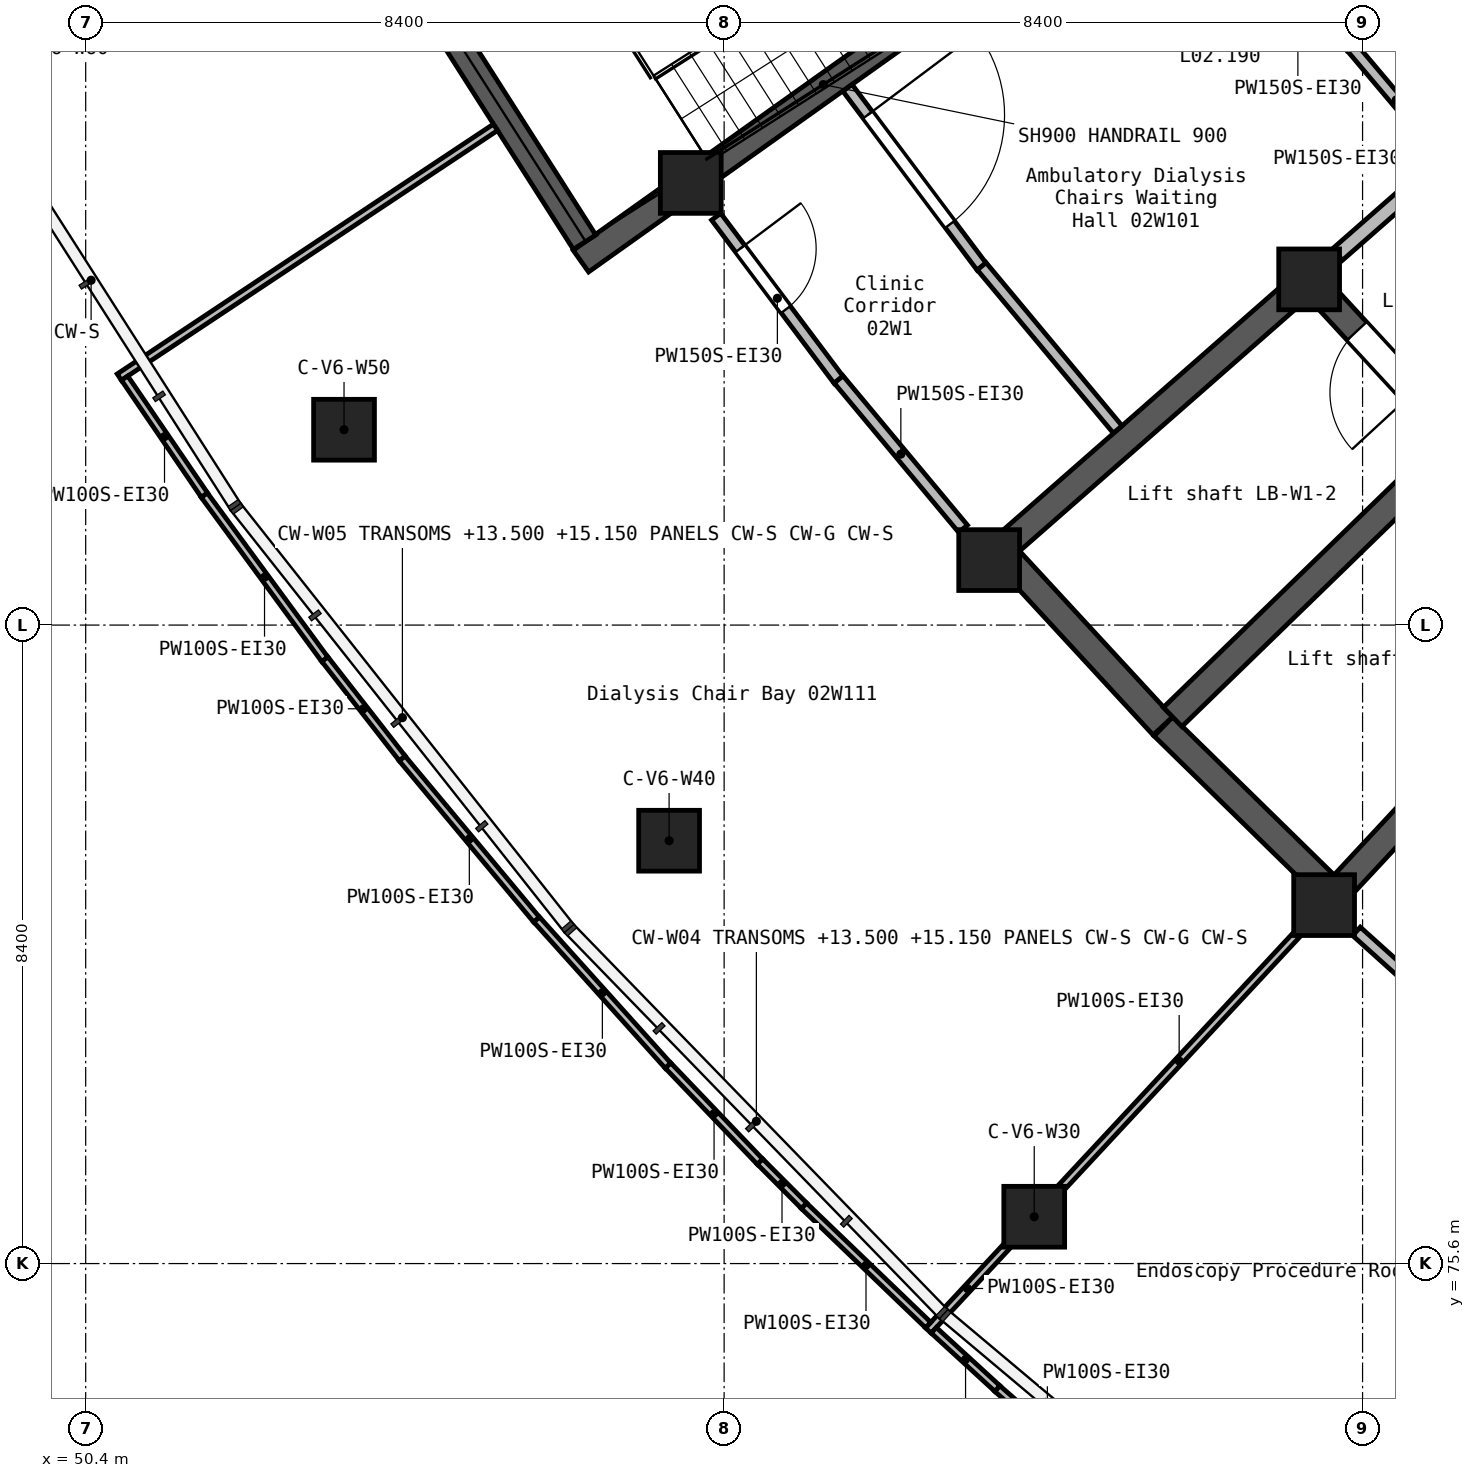
"""IFC4 building model, lengths in metres.
Left out: names, types, materials, properties, quantities, classifications, styles, units other than length and angle.
Written with IfcOpenShell. Run it as: python <this file> out.ifc"""

import sys

from ifc_helpers import new_model, si_unit, direction, frame, frame_2d, origin, origin_2d, place, context, subcontext, project, spatial, rectangle, extrude, element, fill, save


model = new_model("IFC4")
c1 = context("Model", 3, precision=1e-05, world=origin(), true_north=direction((0.0, 1.0)))
c2 = subcontext(c1, "Body", "Model", "MODEL_VIEW")
j1 = project(units=[si_unit("LENGTHUNIT", "METRE"), si_unit("PLANEANGLEUNIT", "RADIAN")], contexts=[c1])
p1 = place(None, origin())
s1 = spatial("IfcSite", under=j1, at=p1, CompositionType="ELEMENT")
p2 = place(p1, origin())
s2 = spatial("IfcBuilding", under=s1, at=p2, CompositionType="ELEMENT")
p3 = place(p2, frame((0.0, 0.0, 12.6)))
s3 = spatial("IfcBuildingStorey", under=s2, at=p3, CompositionType="ELEMENT", Elevation=12.6)
for number, where, z_axis, x_axis in (
    (1, (53.799, 86.57, 0.0), (0.0, 0.0, 1.0), (1.0, 0.0, 0.0)),
    (2, (58.076, 81.163, 0.0), (0.0, 0.0, 1.0), (1.0, 0.0, 0.0)),
    (3, (58.361, 89.817, 0.0), (0.0, 0.0, 1.0), (1.0, 0.0, 0.0)),
    (4, (62.287, 84.855, 0.0), (0.0, 0.0, 1.0), (1.0, 0.0, 0.0)),
    (5, (62.88, 76.216, 0.0), (0.0, 0.0, 1.0), (1.0, 0.0, 0.0)),
    (6, (66.497, 88.548, 0.0), (0.0, 0.0, 1.0), (1.0, 0.0, 0.0)),
    (7, (66.694, 80.316, 0.0), (0.0, 0.0, 1.0), (1.0, 0.0, 0.0)),
):
    element("IfcColumn", number, at=place(p3, frame(where, z_axis=z_axis, x_axis=x_axis)), inside=s3, PredefinedType="COLUMN", context=c2, shape_type="SweptSolid", body=[
        extrude(rectangle(XDim=0.8, YDim=0.8, at=origin_2d()), origin(), (0.0, 0.0, 1.0), 4.2),
    ])
p4 = place(p3, frame((56.916, 88.789, 0.0), z_axis=(0.0, 0.0, 1.0), x_axis=(0.814717690591, 0.579857814157, 0.0)))
e8 = element("IfcWall", 8, at=p4, inside=s3, PredefinedType="SHEAR", context=c2, shape_type="SweptSolid", body=[
    extrude(rectangle(XDim=7.55, YDim=0.35, at=frame_2d((3.775, 0.0))), origin(), (0.0, 0.0, 1.0), 4.2),
])
p5 = place(p3, frame((56.964, 89.038, 0.0), z_axis=(0.0, 0.0, 1.0), x_axis=(-0.537811796172, 0.843064927451, 0.0)))
e9 = element("IfcWall", 9, at=p5, inside=s3, PredefinedType="SHEAR", context=c2, shape_type="SweptSolid", body=[
    extrude(rectangle(XDim=6.139, YDim=0.35, at=frame_2d((3.07, 0.0))), origin(), (0.0, 0.0, 1.0), 4.2),
])
p6 = place(p3, frame((62.305, 84.872, 0.0), z_axis=(0.0, 0.0, 1.0), x_axis=(0.751808220443, 0.659381831471, 0.0)))
e10 = element("IfcWall", 10, at=p6, inside=s3, PredefinedType="SHEAR", context=c2, shape_type="SweptSolid", body=[
    extrude(rectangle(XDim=5.75, YDim=0.35, at=frame_2d((2.875, 0.0))), origin(), (0.0, 0.0, 1.0), 4.2),
])
p7 = place(p3, frame((62.556, 84.858, 0.0), z_axis=(0.0, 0.0, 1.0), x_axis=(0.67818124014, -0.73489469009, 0.0)))
e11 = element("IfcWall", 11, at=p7, inside=s3, PredefinedType="SHEAR", context=c2, shape_type="SweptSolid", body=[
    extrude(rectangle(XDim=2.975, YDim=0.35, at=frame_2d((1.487, 0.0))), origin(), (0.0, 0.0, 1.0), 4.2),
])
p8 = place(p3, frame((64.579, 82.666, 0.0), z_axis=(0.0, 0.0, 1.0), x_axis=(0.714695816666, -0.699435407769, 0.0)))
e12 = element("IfcWall", 12, at=p8, inside=s3, PredefinedType="SHEAR", context=c2, shape_type="SweptSolid", body=[
    extrude(rectangle(XDim=2.976, YDim=0.35, at=frame_2d((1.488, 0.0))), origin(), (0.0, 0.0, 1.0), 4.2),
])
p9 = place(p3, frame((64.702, 82.791, 0.0), z_axis=(0.0, 0.0, 1.0), x_axis=(0.717400873641, 0.696660596345, 0.0)))
e13 = element("IfcWall", 13, at=p9, inside=s3, PredefinedType="SHEAR", context=c2, shape_type="SweptSolid", body=[
    extrude(rectangle(XDim=5.05, YDim=0.35, at=frame_2d((2.525, 0.0))), origin(), (0.0, 0.0, 1.0), 4.2),
])
p10 = place(p3, frame((66.712, 80.334, 0.0), z_axis=(0.0, 0.0, 1.0), x_axis=(0.681084356202, 0.732204957465, 0.0)))
e14 = element("IfcWall", 14, at=p10, inside=s3, PredefinedType="SHEAR", context=c2, shape_type="SweptSolid", body=[
    extrude(rectangle(XDim=5.75, YDim=0.35, at=frame_2d((2.875, 0.0))), origin(), (0.0, 0.0, 1.0), 4.2),
])
p11 = place(p3, frame((68.447, 86.434, 0.0), z_axis=(0.0, 0.0, 1.0), x_axis=(-0.678058558992, 0.735007884704, 0.0)))
e15 = element("IfcWall", 15, at=p11, inside=s3, PredefinedType="SHEAR", context=c2, shape_type="SweptSolid", body=[
    extrude(rectangle(XDim=2.701, YDim=0.35, at=frame_2d((1.35, 0.0))), origin(), (0.0, 0.0, 1.0), 4.2),
])
p12 = place(p11, frame((0.85, 0.0, 0.0)))
e16 = element("IfcOpeningElement", 16, at=p12, cuts=e15, PredefinedType="OPENING", context=c2, shape_type="SweptSolid", body=[
    extrude(rectangle(XDim=1.1, YDim=2.1, at=frame_2d((0.55, 1.05))), frame((0.0, 0.185, 0.0), z_axis=(0.0, -1.0, 0.0), x_axis=(1.0, 0.0, 0.0)), (0.0, 0.0, 1.0), 0.37),
])
p13 = place(p3, frame((66.869, 88.874, 0.0), z_axis=(0.0, 0.0, 1.0), x_axis=(0.751874567132, 0.659306177205, 0.0)))
e17 = element("IfcWall", 17, at=p13, inside=s3, PredefinedType="SOLIDWALL", context=c2, shape_type="SweptSolid", body=[
    extrude(rectangle(XDim=2.004, YDim=0.2, at=frame_2d((1.002, 0.0))), origin(), (0.0, 0.0, 1.0), 3.85),
])
p14 = place(p3, frame((58.695, 89.373, 0.0), z_axis=(0.0, 0.0, 1.0), x_axis=(0.600189191088, -0.799858071724, 0.0)))
e18 = element("IfcWall", 18, at=p14, inside=s3, PredefinedType="PARTITIONING", context=c2, shape_type="SweptSolid", body=[
    extrude(rectangle(XDim=2.684, YDim=0.15, at=frame_2d((1.342, 0.0))), origin(), (0.0, 0.0, 1.0), 3.85),
])
p15 = place(p14, frame((0.526, 0.0, 0.0)))
e19 = element("IfcOpeningElement", 19, at=p15, cuts=e18, PredefinedType="OPENING", context=c2, shape_type="SweptSolid", body=[
    extrude(rectangle(XDim=1.0, YDim=2.1, at=frame_2d((0.5, 1.05))), frame((0.0, 0.085, 0.0), z_axis=(0.0, -1.0, 0.0), x_axis=(1.0, 0.0, 0.0)), (0.0, 0.0, 1.0), 0.17),
])
p16 = place(p3, frame((60.307, 87.231, 0.0), z_axis=(0.0, 0.0, 1.0), x_axis=(0.64023135863, -0.768182144694, 0.0)))
e20 = element("IfcWall", 20, at=p16, inside=s3, PredefinedType="PARTITIONING", context=c2, shape_type="SweptSolid", body=[
    extrude(rectangle(XDim=2.557, YDim=0.15, at=frame_2d((1.278, 0.0))), origin(), (0.0, 0.0, 1.0), 3.85),
])
p17 = place(p3, frame((67.12, 79.971, 0.0), z_axis=(0.0, 0.0, 1.0), x_axis=(0.743284610851, -0.668975326355, 0.0)))
e21 = element("IfcWall", 21, at=p17, inside=s3, PredefinedType="PARTITIONING", context=c2, shape_type="SweptSolid", body=[
    extrude(rectangle(XDim=2.546, YDim=0.15, at=frame_2d((1.273, 0.0))), origin(), (0.0, 0.0, 1.0), 3.85),
])
p18 = place(p3, frame((60.423, 91.068, 0.0), z_axis=(0.0, 0.0, 1.0), x_axis=(0.600119519183, -0.799910346661, 0.0)))
e22 = element("IfcWall", 22, at=p18, inside=s3, PredefinedType="PARTITIONING", context=c2, shape_type="SweptSolid", body=[
    extrude(rectangle(XDim=2.941, YDim=0.15, at=frame_2d((1.471, 0.0))), origin(), (0.0, 0.0, 1.0), 3.85),
])
p19 = place(p18, frame((0.445, 0.0, 0.0)))
e23 = element("IfcOpeningElement", 23, at=p19, cuts=e22, PredefinedType="OPENING", context=c2, shape_type="SweptSolid", body=[
    extrude(rectangle(XDim=1.8, YDim=2.1, at=frame_2d((0.9, 1.05))), frame((0.0, 0.085, 0.0), z_axis=(0.0, -1.0, 0.0), x_axis=(1.0, 0.0, 0.0)), (0.0, 0.0, 1.0), 0.17),
])
p20 = place(p3, frame((62.189, 88.72, 0.0), z_axis=(0.0, 0.0, 1.0), x_axis=(0.640253147886, -0.7681639842, 0.0)))
e24 = element("IfcWall", 24, at=p20, inside=s3, PredefinedType="PARTITIONING", context=c2, shape_type="SweptSolid", body=[
    extrude(rectangle(XDim=2.794, YDim=0.15, at=frame_2d((1.397, 0.0))), origin(), (0.0, 0.0, 1.0), 3.85),
])
p21 = place(p3, frame((67.052, 91.609, 0.0), z_axis=(0.0, 0.0, 1.0), x_axis=(0.645369063346, -0.763870913228, 0.0)))
e25 = element("IfcWall", 25, at=p21, inside=s3, PredefinedType="PARTITIONING", context=c2, shape_type="SweptSolid", body=[
    extrude(rectangle(XDim=1.833, YDim=0.15, at=frame_2d((0.917, 0.0))), origin(), (0.0, 0.0, 1.0), 3.85),
])
p22 = place(p3, frame((61.487, 74.719, 0.0), z_axis=(0.0, 0.0, 1.0), x_axis=(0.681355821593, 0.731952351168, 0.0)))
e26 = element("IfcWall", 26, at=p22, inside=s3, PredefinedType="PARTITIONING", context=c2, shape_type="SweptSolid", body=[
    extrude(rectangle(XDim=1.51, YDim=0.1, at=frame_2d((0.755, 0.0))), origin(), (0.0, 0.0, 1.0), 3.85),
])
p23 = place(p3, frame((63.244, 76.607, 0.0), z_axis=(0.0, 0.0, 1.0), x_axis=(0.681263193371, 0.732038565485, 0.0)))
e27 = element("IfcWall", 27, at=p23, inside=s3, PredefinedType="PARTITIONING", context=c2, shape_type="SweptSolid", body=[
    extrude(rectangle(XDim=4.529, YDim=0.1, at=frame_2d((2.265, 0.0))), origin(), (0.0, 0.0, 1.0), 3.85),
])
p24 = place(p3, frame((50.842, 87.262, 0.0), z_axis=(0.0, 0.0, 1.0), x_axis=(0.833066771492, 0.553172445297, 0.0)))
e28 = element("IfcWall", 28, at=p24, inside=s3, PredefinedType="PARTITIONING", context=c2, shape_type="SweptSolid", body=[
    extrude(rectangle(XDim=5.941, YDim=0.1, at=frame_2d((2.97, 0.0))), origin(), (0.0, 0.0, 1.0), 3.85),
])
p25 = place(p3, frame((54.562, 82.247, 0.0), z_axis=(0.0, 0.0, 1.0), x_axis=(0.640436201221, -0.768011375024, 0.0)))
e29 = element("IfcWall", 29, at=p25, inside=s3, PredefinedType="PARTITIONING", context=c2, shape_type="SweptSolid", body=[
    extrude(rectangle(XDim=2.765, YDim=0.1, at=frame_2d((1.383, 0.0))), origin(), (0.0, 0.0, 1.0), 3.85),
])
p26 = place(p3, frame((56.333, 80.126, 0.0), z_axis=(0.0, 0.0, 1.0), x_axis=(0.66858915831, -0.743631990564, 0.0)))
e30 = element("IfcWall", 30, at=p26, inside=s3, PredefinedType="PARTITIONING", context=c2, shape_type="SweptSolid", body=[
    extrude(rectangle(XDim=2.586, YDim=0.1, at=frame_2d((1.293, 0.0))), origin(), (0.0, 0.0, 1.0), 3.85),
])
p27 = place(p3, frame((51.959, 85.711, 0.0), z_axis=(0.0, 0.0, 1.0), x_axis=(0.591667432582, -0.806182143949, 0.0)))
e31 = element("IfcWall", 31, at=p27, inside=s3, PredefinedType="PARTITIONING", context=c2, shape_type="SweptSolid", body=[
    extrude(rectangle(XDim=2.683, YDim=0.1, at=frame_2d((1.341, 0.0))), origin(), (0.0, 0.0, 1.0), 3.85),
])
p28 = place(p3, frame((59.849, 76.362, 0.0), z_axis=(0.0, 0.0, 1.0), x_axis=(0.721335676567, -0.692585620492, 0.0)))
e32 = element("IfcWall", 32, at=p28, inside=s3, PredefinedType="PARTITIONING", context=c2, shape_type="SweptSolid", body=[
    extrude(rectangle(XDim=2.267, YDim=0.1, at=frame_2d((1.134, 0.0))), origin(), (0.0, 0.0, 1.0), 3.85),
])
p29 = place(p3, frame((50.913, 87.248, 0.0), z_axis=(0.0, 0.0, 1.0), x_axis=(0.563658336128, -0.826008038771, 0.0)))
e33 = element("IfcWall", 33, at=p29, inside=s3, PredefinedType="PARTITIONING", context=c2, shape_type="SweptSolid", body=[
    extrude(rectangle(XDim=1.861, YDim=0.1, at=frame_2d((0.931, 0.0))), origin(), (0.0, 0.0, 1.0), 3.85),
])
p30 = place(p3, frame((62.393, 73.956, 0.0), z_axis=(0.0, 0.0, 1.0), x_axis=(0.75241276557, -0.658691908412, 0.0)))
e34 = element("IfcWall", 34, at=p30, inside=s3, PredefinedType="PARTITIONING", context=c2, shape_type="SweptSolid", body=[
    extrude(rectangle(XDim=1.753, YDim=0.1, at=frame_2d((0.876, 0.0))), origin(), (0.0, 0.0, 1.0), 3.85),
])
p31 = place(p3, frame((53.547, 83.551, 0.0), z_axis=(0.0, 0.0, 1.0), x_axis=(0.615268617412, -0.788317530205, 0.0)))
e35 = element("IfcWall", 35, at=p31, inside=s3, PredefinedType="PARTITIONING", context=c2, shape_type="SweptSolid", body=[
    extrude(rectangle(XDim=1.654, YDim=0.1, at=frame_2d((0.827, 0.0))), origin(), (0.0, 0.0, 1.0), 3.85),
])
p32 = place(p3, frame((58.062, 78.205, 0.0), z_axis=(0.0, 0.0, 1.0), x_axis=(0.691314467962, -0.722554016242, 0.0)))
e36 = element("IfcWall", 36, at=p32, inside=s3, PredefinedType="PARTITIONING", context=c2, shape_type="SweptSolid", body=[
    extrude(rectangle(XDim=1.75, YDim=0.1, at=frame_2d((0.875, 0.0))), origin(), (0.0, 0.0, 1.0), 3.85),
])
p33 = place(p3, frame((61.558, 74.722, 0.0), z_axis=(0.0, 0.0, 1.0), x_axis=(0.737725592981, -0.675100695794, 0.0)))
e37 = element("IfcWall", 37, at=p33, inside=s3, PredefinedType="PARTITIONING", context=c2, shape_type="SweptSolid", body=[
    extrude(rectangle(XDim=1.135, YDim=0.1, at=frame_2d((0.567, 0.0))), origin(), (0.0, 0.0, 1.0), 3.85),
])
p34 = place(p3, frame((59.273, 76.941, 0.0), z_axis=(0.0, 0.0, 1.0), x_axis=(0.705912346609, -0.708299201542, 0.0)))
e38 = element("IfcWall", 38, at=p34, inside=s3, PredefinedType="PARTITIONING", context=c2, shape_type="SweptSolid", body=[
    extrude(rectangle(XDim=0.818, YDim=0.1, at=frame_2d((0.409, 0.0))), origin(), (0.0, 0.0, 1.0), 3.85),
])
p35 = place(p19, frame((1.8, 0.0, 0.0), z_axis=(0.0, 0.0, 1.0), x_axis=(-1.0, 0.0, 0.0)))
e39 = element("IfcDoor", 39, at=p35, inside=s3, OperationType="DOUBLE_DOOR_SINGLE_SWING", PredefinedType="DOOR", context=c2, shape_type="SweptSolid", body=[
    extrude(rectangle(XDim=1.8, YDim=2.1, at=frame_2d((0.9, 1.05))), frame((0.0, 0.025, 0.0), z_axis=(0.0, -1.0, 0.0), x_axis=(1.0, 0.0, 0.0)), (0.0, 0.0, 1.0), 0.05),
])
fill(e23, e39)
p36 = place(p15, frame((1.0, 0.0, 0.0), z_axis=(0.0, 0.0, 1.0), x_axis=(-1.0, 0.0, 0.0)))
e40 = element("IfcDoor", 40, at=p36, inside=s3, OperationType="SINGLE_SWING_RIGHT", PredefinedType="DOOR", context=c2, shape_type="SweptSolid", body=[
    extrude(rectangle(XDim=1.0, YDim=2.1, at=frame_2d((0.5, 1.05))), frame((0.0, 0.025, 0.0), z_axis=(0.0, -1.0, 0.0), x_axis=(1.0, 0.0, 0.0)), (0.0, 0.0, 1.0), 0.05),
])
fill(e19, e40)
p37 = place(p12, origin())
e41 = element("IfcDoor", 41, at=p37, inside=s3, OperationType="DOUBLE_DOOR_SLIDING", PredefinedType="DOOR", context=c2, shape_type="SweptSolid", body=[
    extrude(rectangle(XDim=1.1, YDim=2.1, at=frame_2d((0.55, 1.05))), frame((0.0, 0.025, 0.0), z_axis=(0.0, -1.0, 0.0), x_axis=(1.0, 0.0, 0.0)), (0.0, 0.0, 1.0), 0.05),
])
fill(e16, e41)
save(model, sys.argv[1])
